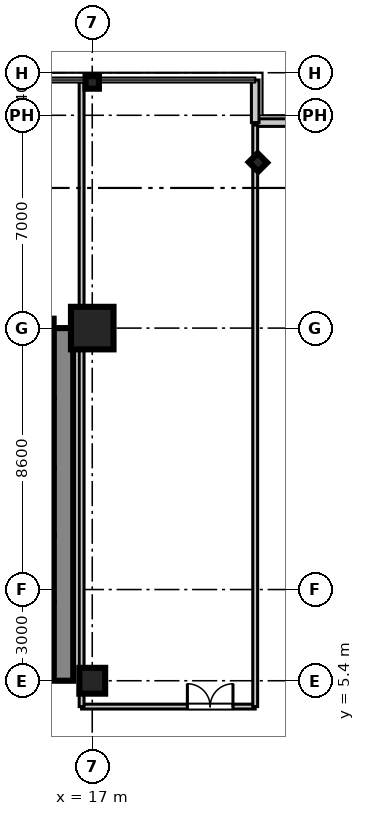
"""IFC4 building model, lengths in metres.
Left out: names, types, materials, properties, quantities, classifications, styles, units other than length and angle.
Written with IfcOpenShell. Run it as: python <this file> out.ifc"""

import sys

from ifc_helpers import new_model, si_unit, direction, frame, frame_2d, origin, origin_2d, place, context, subcontext, project, spatial, rectangle, i_section, extrude, source, transform, mapped, element, fill, save


model = new_model("IFC4")
c1 = context("Model", 3, precision=1e-05, world=origin(), true_north=direction((0.0, 1.0)))
c2 = subcontext(c1, "Body", "Model", "MODEL_VIEW")
j1 = project(units=[si_unit("LENGTHUNIT", "METRE"), si_unit("PLANEANGLEUNIT", "RADIAN")], contexts=[c1])
p1 = place(None, origin())
s1 = spatial("IfcSite", under=j1, at=p1, CompositionType="ELEMENT")
p2 = place(p1, origin())
s2 = spatial("IfcBuilding", under=s1, at=p2, CompositionType="ELEMENT")
p3 = place(p2, frame((0.0, 0.0, 54.3)))
s3 = spatial("IfcBuildingStorey", under=s2, at=p3, CompositionType="ELEMENT", Elevation=54.3)
m1 = source(origin(), c2, "Body", "SweptSolid", [
    extrude(rectangle(XDim=0.85, YDim=0.85, at=origin_2d()), origin(), (0.0, 0.0, 1.0), 3.605),
])
p4 = place(p3, frame((17.0, 5.4, 0.0), z_axis=(0.0, 0.0, 1.0), x_axis=(1.0, 0.0, 0.0)))
e1 = element("IfcColumn", 1, at=p4, inside=s3, PredefinedType="PILASTER", context=c2, shape_type="MappedRepresentation", body=[
    mapped(m1, transform((0.0, 0.0, 0.0), scale=1.0)),
])
m2 = source(origin(), c2, "Body", "SweptSolid", [
    extrude(rectangle(XDim=1.4, YDim=1.4, at=origin_2d()), origin(), (0.0, 0.0, 1.0), 3.605),
])
p5 = place(p3, frame((17.0, 17.0, 0.0), z_axis=(0.0, 0.0, 1.0), x_axis=(1.0, 0.0, 0.0)))
e2 = element("IfcColumn", 2, at=p5, inside=s3, PredefinedType="COLUMN", context=c2, shape_type="MappedRepresentation", body=[
    mapped(m2, transform((0.0, 0.0, 0.0), scale=1.0)),
])
m3 = source(origin(), c2, "Body", "SweptSolid", [
    extrude(i_section(OverallWidth=0.412, OverallDepth=0.438, WebThickness=0.023, FlangeThickness=0.036, at=origin_2d()), origin(), (0.0, 0.0, 1.0), 3.605),
])
for number, where, z_axis, x_axis in (
    (3, (17.0, 25.08, 0.0), (0.0, 0.0, 1.0), (0.0, 1.0, 0.0)),
    (4, (22.45, 22.45, 0.0), (0.0, 0.0, 1.0), (0.707, 0.707, 0.0)),
):
    element("IfcColumn", number, at=place(p3, frame(where, z_axis=z_axis, x_axis=x_axis)), inside=s3, PredefinedType="COLUMN", context=c2, shape_type="MappedRepresentation", body=[
        mapped(m3, transform((0.0, 0.0, 0.0), scale=1.0)),
    ])
m4 = source(origin(), c2, "Body", "SweptSolid", [
    extrude(rectangle(XDim=11.6, YDim=0.65, at=frame_2d((5.8, 0.0))), origin(), (0.0, 0.0, 1.0), 3.37),
])
p6 = place(p3, frame((16.05, 5.4, 0.0), z_axis=(0.0, 0.0, 1.0), x_axis=(0.0, 1.0, 0.0)))
e5 = element("IfcWall", 5, at=p6, inside=s3, PredefinedType="SHEAR", context=c2, shape_type="MappedRepresentation", body=[
    mapped(m4, transform((0.0, 0.0, 0.0), scale=1.0)),
])
m5 = source(origin(), c2, "Body", "SweptSolid", [
    extrude(rectangle(XDim=2.36, YDim=0.22, at=frame_2d((1.18, 0.0))), origin(), (0.0, 0.0, 1.0), 3.37),
])
p7 = place(p3, frame((15.62, 5.64, 0.0), z_axis=(0.0, 0.0, 1.0), x_axis=(0.0, 1.0, 0.0)))
e6 = element("IfcWall", 6, at=p7, inside=s3, PredefinedType="SHEAR", context=c2, shape_type="MappedRepresentation", body=[
    mapped(m5, transform((0.0, 0.0, 0.0), scale=1.0)),
])
m6 = source(origin(), c2, "Body", "SweptSolid", [
    extrude(rectangle(XDim=2.2, YDim=0.22, at=frame_2d((1.1, 0.0))), origin(), (0.0, 0.0, 1.0), 3.37),
])
for number, where, z_axis, x_axis in (
    (7, (15.62, 8.0, 0.0), (0.0, 0.0, 1.0), (0.0, 1.0, 0.0)),
    (8, (15.62, 10.2, 0.0), (0.0, 0.0, 1.0), (0.0, 1.0, 0.0)),
):
    element("IfcWall", number, at=place(p3, frame(where, z_axis=z_axis, x_axis=x_axis)), inside=s3, PredefinedType="SHEAR", context=c2, shape_type="MappedRepresentation", body=[
        mapped(m6, transform((0.0, 0.0, 0.0), scale=1.0)),
    ])
m7 = source(origin(), c2, "Body", "SweptSolid", [
    extrude(rectangle(XDim=2.3, YDim=0.22, at=frame_2d((1.15, 0.0))), origin(), (0.0, 0.0, 1.0), 3.37),
])
p8 = place(p3, frame((15.62, 12.4, 0.0), z_axis=(0.0, 0.0, 1.0), x_axis=(0.0, 1.0, 0.0)))
e9 = element("IfcWall", 9, at=p8, inside=s3, PredefinedType="SHEAR", context=c2, shape_type="MappedRepresentation", body=[
    mapped(m7, transform((0.0, 0.0, 0.0), scale=1.0)),
])
m8 = source(origin(), c2, "Body", "SweptSolid", [
    extrude(rectangle(XDim=2.61, YDim=0.22, at=frame_2d((1.305, 0.0))), origin(), (0.0, 0.0, 1.0), 3.37),
])
p9 = place(p3, frame((15.62, 14.7, 0.0), z_axis=(0.0, 0.0, 1.0), x_axis=(0.0, 1.0, 0.0)))
e10 = element("IfcWall", 10, at=p9, inside=s3, PredefinedType="SHEAR", context=c2, shape_type="MappedRepresentation", body=[
    mapped(m8, transform((0.0, 0.0, 0.0), scale=1.0)),
])
m9 = source(origin(), c2, "Body", "SweptSolid", [
    extrude(rectangle(XDim=1.4, YDim=0.25, at=frame_2d((0.7, 0.0))), origin(), (0.0, 0.0, 1.0), 3.37),
])
for number, where, z_axis, x_axis in (
    (11, (22.36, 23.76, 0.0), (0.0, 0.0, 1.0), (1.0, 0.0, 0.0)),
    (12, (22.36, 23.76, 0.0), (0.0, 0.0, 1.0), (0.0, 1.0, 0.0)),
):
    element("IfcWall", number, at=place(p3, frame(where, z_axis=z_axis, x_axis=x_axis)), inside=s3, PredefinedType="STANDARD", context=c2, shape_type="MappedRepresentation", body=[
        mapped(m9, transform((0.0, 0.0, 0.0), scale=1.0)),
    ])
m10 = source(origin(), c2, "Body", "SweptSolid", [
    extrude(rectangle(XDim=5.71, YDim=0.16, at=frame_2d((2.855, 0.0))), origin(), (0.0, 0.0, 1.0), 2.71),
])
p10 = place(p3, frame((16.65, 4.55, 0.0), z_axis=(0.0, 0.0, 1.0), x_axis=(1.0, 0.0, 0.0)))
e13 = element("IfcWall", 13, at=p10, inside=s3, PredefinedType="PARTITIONING", context=c2, shape_type="MappedRepresentation", body=[
    mapped(m10, transform((0.0, 0.0, 0.0), scale=1.0)),
])
p11 = place(p10, frame((3.479, 0.0, 0.0)))
e14 = element("IfcOpeningElement", 14, at=p11, cuts=e13, PredefinedType="OPENING", context=c2, shape_type="SweptSolid", body=[
    extrude(rectangle(XDim=1.5, YDim=2.15, at=frame_2d((0.75, 1.075))), frame((0.0, 0.09, 0.0), z_axis=(0.0, -1.0, 0.0), x_axis=(1.0, 0.0, 0.0)), (0.0, 0.0, 1.0), 0.18),
])
m11 = source(origin(), c2, "Body", "SweptSolid", [
    extrude(rectangle(XDim=20.55, YDim=0.16, at=frame_2d((10.275, 0.0))), origin(), (0.0, 0.0, 1.0), 2.71),
])
p12 = place(p3, frame((16.65, 4.55, 0.0), z_axis=(0.0, 0.0, 1.0), x_axis=(0.0, 1.0, 0.0)))
e15 = element("IfcWall", 15, at=p12, inside=s3, PredefinedType="PARTITIONING", context=c2, shape_type="MappedRepresentation", body=[
    mapped(m11, transform((0.0, 0.0, 0.0), scale=1.0)),
])
m12 = source(origin(), c2, "Body", "SweptSolid", [
    extrude(rectangle(XDim=19.13, YDim=0.16, at=frame_2d((9.565, 0.0))), origin(), (0.0, 0.0, 1.0), 2.71),
])
p13 = place(p3, frame((22.36, 4.55, 0.0), z_axis=(0.0, 0.0, 1.0), x_axis=(0.0, 1.0, 0.0)))
e16 = element("IfcWall", 16, at=p13, inside=s3, PredefinedType="PARTITIONING", context=c2, shape_type="MappedRepresentation", body=[
    mapped(m12, transform((0.0, 0.0, 0.0), scale=1.0)),
])
m13 = source(origin(), c2, "Body", "SweptSolid", [
    extrude(rectangle(XDim=1.5, YDim=2.15, at=frame_2d((0.75, 1.075))), frame((0.0, 0.025, 0.0), z_axis=(0.0, -1.0, 0.0), x_axis=(1.0, 0.0, 0.0)), (0.0, 0.0, 1.0), 0.05),
])
p14 = place(p11, origin())
e17 = element("IfcDoor", 17, at=p14, inside=s3, OperationType="DOUBLE_DOOR_SINGLE_SWING", PredefinedType="DOOR", context=c2, shape_type="MappedRepresentation", body=[
    mapped(m13, transform((0.0, 0.0, 0.0), scale=1.0)),
])
fill(e14, e17)
save(model, sys.argv[1])
